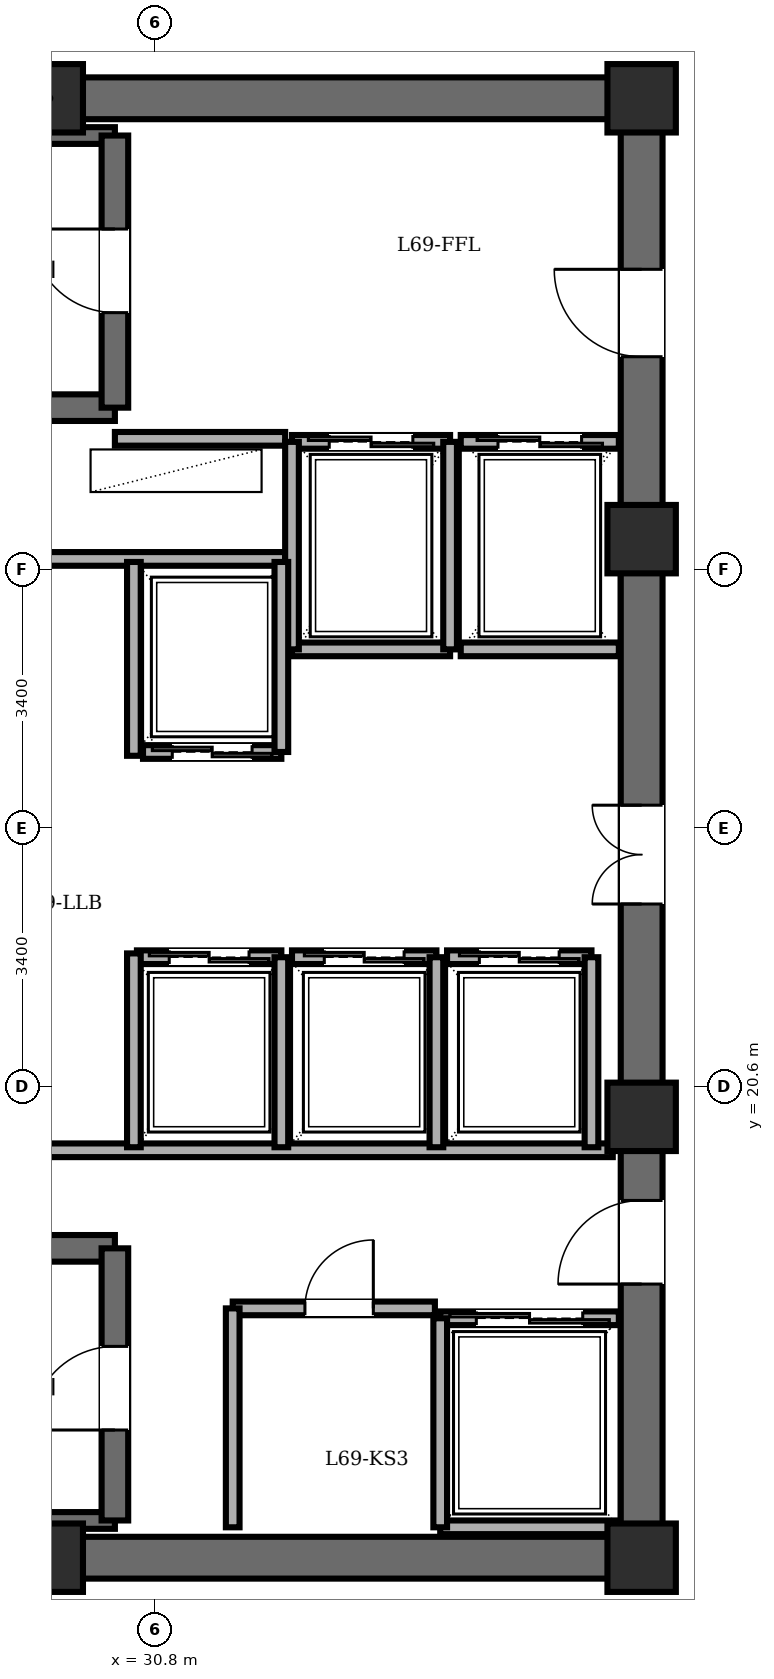
"""IFC4 building model, lengths in metres.
Left out: names, types, materials, properties, quantities, classifications, styles, units other than length and angle.
Written with IfcOpenShell. Run it as: python <this file> out.ifc"""

import sys

from ifc_helpers import new_model, si_unit, direction, frame, frame_2d, origin, origin_2d, place, context, subcontext, project, spatial, rectangle, extrude, element, fill, save


model = new_model("IFC4")
c1 = context("Model", 3, precision=1e-05, world=origin(), true_north=direction((0.0, 1.0)))
c2 = subcontext(c1, "Body", "Model", "MODEL_VIEW")
j1 = project(units=[si_unit("LENGTHUNIT", "METRE"), si_unit("PLANEANGLEUNIT", "RADIAN")], contexts=[c1])
p1 = place(None, origin())
s1 = spatial("IfcSite", under=j1, at=p1, CompositionType="ELEMENT")
p2 = place(p1, origin())
s2 = spatial("IfcBuilding", under=s1, at=p2, CompositionType="ELEMENT")
p3 = place(p2, frame((0.0, 0.0, 266.1)))
s3 = spatial("IfcBuildingStorey", under=s2, at=p3, CompositionType="ELEMENT", Elevation=266.1)
for number, where, z_axis, x_axis in (
    (1, (29.4, 14.4, 0.0), (0.0, 0.0, 1.0), (1.0, 0.0, 0.0)),
    (2, (37.2, 14.4, 0.0), (0.0, 0.0, 1.0), (1.0, 0.0, 0.0)),
    (3, (37.2, 20.2, 0.0), (0.0, 0.0, 1.0), (1.0, 0.0, 0.0)),
    (4, (37.2, 27.8, 0.0), (0.0, 0.0, 1.0), (1.0, 0.0, 0.0)),
    (5, (37.2, 33.6, 0.0), (0.0, 0.0, 1.0), (1.0, 0.0, 0.0)),
    (6, (29.4, 33.6, 0.0), (0.0, 0.0, 1.0), (1.0, 0.0, 0.0)),
):
    element("IfcColumn", number, at=place(p3, frame(where, z_axis=z_axis, x_axis=x_axis)), inside=s3, PredefinedType="COLUMN", context=c2, shape_type="SweptSolid", body=[
        extrude(rectangle(XDim=0.9, YDim=0.9, at=origin_2d()), origin(), (0.0, 0.0, 1.0), 3.65),
    ])
for number, where, z_axis, x_axis in (
    (7, (21.6, 33.6, 0.0), (0.0, 0.0, 1.0), (1.0, 0.0, 0.0)),
    (8, (37.2, 14.4, 0.0), (0.0, 0.0, 1.0), (-1.0, 0.0, 0.0)),
):
    element("IfcWall", number, at=place(p3, frame(where, z_axis=z_axis, x_axis=x_axis)), inside=s3, PredefinedType="SHEAR", context=c2, shape_type="SweptSolid", body=[
        extrude(rectangle(XDim=15.6, YDim=0.55, at=frame_2d((7.8, 0.0))), origin(), (0.0, 0.0, 1.0), 3.45),
    ])
p4 = place(p3, frame((37.2, 14.4, 0.0), z_axis=(0.0, 0.0, 1.0), x_axis=(0.0, 1.0, 0.0)))
e9 = element("IfcWall", 9, at=p4, inside=s3, PredefinedType="SHEAR", context=c2, shape_type="SweptSolid", body=[
    extrude(rectangle(XDim=19.2, YDim=0.55, at=frame_2d((9.6, 0.0))), origin(), (0.0, 0.0, 1.0), 3.45),
])
p5 = place(p4, frame((15.8, 0.0, 0.0)))
e10 = element("IfcOpeningElement", 10, at=p5, cuts=e9, PredefinedType="OPENING", context=c2, shape_type="SweptSolid", body=[
    extrude(rectangle(XDim=1.15, YDim=2.15, at=frame_2d((0.575, 1.075))), frame((0.0, 0.285, 0.0), z_axis=(0.0, -1.0, 0.0), x_axis=(1.0, 0.0, 0.0)), (0.0, 0.0, 1.0), 0.57),
])
p6 = place(p4, frame((3.6, 0.0, 0.0)))
e11 = element("IfcOpeningElement", 11, at=p6, cuts=e9, PredefinedType="OPENING", context=c2, shape_type="SweptSolid", body=[
    extrude(rectangle(XDim=1.1, YDim=2.15, at=frame_2d((0.55, 1.075))), frame((0.0, 0.285, 0.0), z_axis=(0.0, -1.0, 0.0), x_axis=(1.0, 0.0, 0.0)), (0.0, 0.0, 1.0), 0.57),
])
p7 = place(p4, frame((8.6, 0.0, 0.0)))
e12 = element("IfcOpeningElement", 12, at=p7, cuts=e9, PredefinedType="OPENING", context=c2, shape_type="SweptSolid", body=[
    extrude(rectangle(XDim=1.3, YDim=2.2, at=frame_2d((0.65, 1.1))), frame((0.0, 0.285, 0.0), z_axis=(0.0, -1.0, 0.0), x_axis=(1.0, 0.0, 0.0)), (0.0, 0.0, 1.0), 0.57),
])
p8 = place(p3, frame((22.48, 29.53, 0.0), z_axis=(0.0, 0.0, 1.0), x_axis=(1.0, 0.0, 0.0)))
e13 = element("IfcWall", 13, at=p8, inside=s3, PredefinedType="SOLIDWALL", context=c2, shape_type="SweptSolid", body=[
    extrude(rectangle(XDim=7.79, YDim=0.35, at=frame_2d((3.895, 0.0))), origin(), (0.0, 0.0, 1.0), 3.45),
])
p9 = place(p3, frame((22.48, 33.11, 0.0), z_axis=(0.0, 0.0, 1.0), x_axis=(1.0, 0.0, 0.0)))
e14 = element("IfcWall", 14, at=p9, inside=s3, PredefinedType="PARTITIONING", context=c2, shape_type="SweptSolid", body=[
    extrude(rectangle(XDim=7.79, YDim=0.22, at=frame_2d((3.895, 0.0))), origin(), (0.0, 0.0, 1.0), 3.45),
])
p10 = place(p3, frame((30.27, 29.53, 0.0), z_axis=(0.0, 0.0, 1.0), x_axis=(0.0, 1.0, 0.0)))
e15 = element("IfcWall", 15, at=p10, inside=s3, PredefinedType="SOLIDWALL", context=c2, shape_type="SweptSolid", body=[
    extrude(rectangle(XDim=3.58, YDim=0.35, at=frame_2d((1.79, 0.0))), origin(), (0.0, 0.0, 1.0), 3.45),
])
p11 = place(p10, frame((1.25, 0.0, 0.0)))
e16 = element("IfcOpeningElement", 16, at=p11, cuts=e15, PredefinedType="OPENING", context=c2, shape_type="SweptSolid", body=[
    extrude(rectangle(XDim=1.1, YDim=2.15, at=frame_2d((0.55, 1.075))), frame((0.0, 0.185, 0.0), z_axis=(0.0, -1.0, 0.0), x_axis=(1.0, 0.0, 0.0)), (0.0, 0.0, 1.0), 0.37),
])
p12 = place(p3, frame((22.48, 18.47, 0.0), z_axis=(0.0, 0.0, 1.0), x_axis=(1.0, 0.0, 0.0)))
e17 = element("IfcWall", 17, at=p12, inside=s3, PredefinedType="SOLIDWALL", context=c2, shape_type="SweptSolid", body=[
    extrude(rectangle(XDim=7.79, YDim=0.35, at=frame_2d((3.895, 0.0))), origin(), (0.0, 0.0, 1.0), 3.45),
])
p13 = place(p3, frame((22.48, 14.89, 0.0), z_axis=(0.0, 0.0, 1.0), x_axis=(1.0, 0.0, 0.0)))
e18 = element("IfcWall", 18, at=p13, inside=s3, PredefinedType="PARTITIONING", context=c2, shape_type="SweptSolid", body=[
    extrude(rectangle(XDim=7.79, YDim=0.22, at=frame_2d((3.895, 0.0))), origin(), (0.0, 0.0, 1.0), 3.45),
])
p14 = place(p3, frame((30.27, 14.89, 0.0), z_axis=(0.0, 0.0, 1.0), x_axis=(0.0, 1.0, 0.0)))
e19 = element("IfcWall", 19, at=p14, inside=s3, PredefinedType="SOLIDWALL", context=c2, shape_type="SweptSolid", body=[
    extrude(rectangle(XDim=3.58, YDim=0.35, at=frame_2d((1.79, 0.0))), origin(), (0.0, 0.0, 1.0), 3.45),
])
p15 = place(p14, frame((1.19, 0.0, 0.0)))
e20 = element("IfcOpeningElement", 20, at=p15, cuts=e19, PredefinedType="OPENING", context=c2, shape_type="SweptSolid", body=[
    extrude(rectangle(XDim=1.1, YDim=2.15, at=frame_2d((0.55, 1.075))), frame((0.0, 0.185, 0.0), z_axis=(0.0, -1.0, 0.0), x_axis=(1.0, 0.0, 0.0)), (0.0, 0.0, 1.0), 0.37),
])
p16 = place(p3, frame((30.27, 29.12, 0.0), z_axis=(0.0, 0.0, 1.0), x_axis=(1.0, 0.0, 0.0)))
e21 = element("IfcWall", 21, at=p16, inside=s3, PredefinedType="PARTITIONING", context=c2, shape_type="SweptSolid", body=[
    extrude(rectangle(XDim=2.24, YDim=0.18, at=frame_2d((1.12, 0.0))), origin(), (0.0, 0.0, 1.0), 3.45),
])
p17 = place(p3, frame((21.95, 27.54, 0.0), z_axis=(0.0, 0.0, 1.0), x_axis=(1.0, 0.0, 0.0)))
e22 = element("IfcWall", 22, at=p17, inside=s3, PredefinedType="PARTITIONING", context=c2, shape_type="SweptSolid", body=[
    extrude(rectangle(XDim=10.56, YDim=0.18, at=frame_2d((5.28, 0.0))), origin(), (0.0, 0.0, 1.0), 3.45),
])
p18 = place(p3, frame((21.95, 19.76, 0.0), z_axis=(0.0, 0.0, 1.0), x_axis=(1.0, 0.0, 0.0)))
e23 = element("IfcWall", 23, at=p18, inside=s3, PredefinedType="PARTITIONING", context=c2, shape_type="SweptSolid", body=[
    extrude(rectangle(XDim=14.87, YDim=0.18, at=frame_2d((7.435, 0.0))), origin(), (0.0, 0.0, 1.0), 3.45),
])
p19 = place(p3, frame((31.82, 17.68, 0.0), z_axis=(0.0, 0.0, 1.0), x_axis=(1.0, 0.0, 0.0)))
e24 = element("IfcWall", 24, at=p19, inside=s3, PredefinedType="PARTITIONING", context=c2, shape_type="SweptSolid", body=[
    extrude(rectangle(XDim=2.66, YDim=0.18, at=frame_2d((1.33, 0.0))), origin(), (0.0, 0.0, 1.0), 3.45),
])
p20 = place(p19, frame((0.95, 0.0, 0.0)))
e25 = element("IfcOpeningElement", 25, at=p20, cuts=e24, PredefinedType="OPENING", context=c2, shape_type="SweptSolid", body=[
    extrude(rectangle(XDim=0.9, YDim=2.05, at=frame_2d((0.45, 1.025))), frame((0.0, 0.1, 0.0), z_axis=(0.0, -1.0, 0.0), x_axis=(1.0, 0.0, 0.0)), (0.0, 0.0, 1.0), 0.2),
])
p21 = place(p3, frame((31.82, 14.8, 0.0), z_axis=(0.0, 0.0, 1.0), x_axis=(0.0, 1.0, 0.0)))
e26 = element("IfcWall", 26, at=p21, inside=s3, PredefinedType="PARTITIONING", context=c2, shape_type="SweptSolid", body=[
    extrude(rectangle(XDim=2.88, YDim=0.18, at=frame_2d((1.44, 0.0))), origin(), (0.0, 0.0, 1.0), 3.45),
])
p22 = place(p3, frame((32.6, 29.08, 0.0), z_axis=(0.0, 0.0, 1.0), x_axis=(1.0, 0.0, 0.0)))
e27 = element("IfcWall", 27, at=p22, inside=s3, PredefinedType="PARTITIONING", context=c2, shape_type="SweptSolid", body=[
    extrude(rectangle(XDim=2.08, YDim=0.18, at=frame_2d((1.04, 0.0))), origin(), (0.0, 0.0, 1.0), 3.45),
])
p23 = place(p22, frame((0.49, 0.0, 0.0)))
e28 = element("IfcOpeningElement", 28, at=p23, cuts=e27, PredefinedType="OPENING", context=c2, shape_type="SweptSolid", body=[
    extrude(rectangle(XDim=1.1, YDim=2.2, at=frame_2d((0.55, 1.1))), frame((0.0, 0.1, 0.0), z_axis=(0.0, -1.0, 0.0), x_axis=(1.0, 0.0, 0.0)), (0.0, 0.0, 1.0), 0.2),
])
p24 = place(p3, frame((34.68, 26.35, 0.0), z_axis=(0.0, 0.0, 1.0), x_axis=(-1.0, 0.0, 0.0)))
e29 = element("IfcWall", 29, at=p24, inside=s3, PredefinedType="PARTITIONING", context=c2, shape_type="SweptSolid", body=[
    extrude(rectangle(XDim=2.08, YDim=0.18, at=frame_2d((1.04, 0.0))), origin(), (0.0, 0.0, 1.0), 3.45),
])
for number, where, z_axis, x_axis in (
    (30, (34.68, 26.35, 0.0), (0.0, 0.0, 1.0), (0.0, 1.0, 0.0)),
    (31, (32.6, 29.08, 0.0), (0.0, 0.0, 1.0), (0.0, -1.0, 0.0)),
):
    element("IfcWall", number, at=place(p3, frame(where, z_axis=z_axis, x_axis=x_axis)), inside=s3, PredefinedType="PARTITIONING", context=c2, shape_type="SweptSolid", body=[
        extrude(rectangle(XDim=2.73, YDim=0.18, at=frame_2d((1.365, 0.0))), origin(), (0.0, 0.0, 1.0), 3.45),
    ])
p25 = place(p3, frame((34.82, 29.08, 0.0), z_axis=(0.0, 0.0, 1.0), x_axis=(1.0, 0.0, 0.0)))
e32 = element("IfcWall", 32, at=p25, inside=s3, PredefinedType="PARTITIONING", context=c2, shape_type="SweptSolid", body=[
    extrude(rectangle(XDim=2.08, YDim=0.18, at=frame_2d((1.04, 0.0))), origin(), (0.0, 0.0, 1.0), 3.45),
])
p26 = place(p25, frame((0.49, 0.0, 0.0)))
e33 = element("IfcOpeningElement", 33, at=p26, cuts=e32, PredefinedType="OPENING", context=c2, shape_type="SweptSolid", body=[
    extrude(rectangle(XDim=1.1, YDim=2.2, at=frame_2d((0.55, 1.1))), frame((0.0, 0.1, 0.0), z_axis=(0.0, -1.0, 0.0), x_axis=(1.0, 0.0, 0.0)), (0.0, 0.0, 1.0), 0.2),
])
p27 = place(p3, frame((36.9, 26.35, 0.0), z_axis=(0.0, 0.0, 1.0), x_axis=(-1.0, 0.0, 0.0)))
e34 = element("IfcWall", 34, at=p27, inside=s3, PredefinedType="PARTITIONING", context=c2, shape_type="SweptSolid", body=[
    extrude(rectangle(XDim=2.08, YDim=0.18, at=frame_2d((1.04, 0.0))), origin(), (0.0, 0.0, 1.0), 3.45),
])
p28 = place(p3, frame((34.55, 17.55, 0.0), z_axis=(0.0, 0.0, 1.0), x_axis=(1.0, 0.0, 0.0)))
e35 = element("IfcWall", 35, at=p28, inside=s3, PredefinedType="PARTITIONING", context=c2, shape_type="SweptSolid", body=[
    extrude(rectangle(XDim=2.35, YDim=0.18, at=frame_2d((1.175, 0.0))), origin(), (0.0, 0.0, 1.0), 3.45),
])
p29 = place(p28, frame((0.475, 0.0, 0.0)))
e36 = element("IfcOpeningElement", 36, at=p29, cuts=e35, PredefinedType="OPENING", context=c2, shape_type="SweptSolid", body=[
    extrude(rectangle(XDim=1.4, YDim=2.3, at=frame_2d((0.7, 1.15))), frame((0.0, 0.1, 0.0), z_axis=(0.0, -1.0, 0.0), x_axis=(1.0, 0.0, 0.0)), (0.0, 0.0, 1.0), 0.2),
])
p30 = place(p3, frame((36.9, 14.8, 0.0), z_axis=(0.0, 0.0, 1.0), x_axis=(-1.0, 0.0, 0.0)))
e37 = element("IfcWall", 37, at=p30, inside=s3, PredefinedType="PARTITIONING", context=c2, shape_type="SweptSolid", body=[
    extrude(rectangle(XDim=2.35, YDim=0.18, at=frame_2d((1.175, 0.0))), origin(), (0.0, 0.0, 1.0), 3.45),
])
p31 = place(p3, frame((34.55, 17.55, 0.0), z_axis=(0.0, 0.0, 1.0), x_axis=(0.0, -1.0, 0.0)))
e38 = element("IfcWall", 38, at=p31, inside=s3, PredefinedType="PARTITIONING", context=c2, shape_type="SweptSolid", body=[
    extrude(rectangle(XDim=2.75, YDim=0.18, at=frame_2d((1.375, 0.0))), origin(), (0.0, 0.0, 1.0), 3.45),
])
p32 = place(p3, frame((32.46, 25.0, 0.0), z_axis=(0.0, 0.0, 1.0), x_axis=(-1.0, 0.0, 0.0)))
e39 = element("IfcWall", 39, at=p32, inside=s3, PredefinedType="PARTITIONING", context=c2, shape_type="SweptSolid", body=[
    extrude(rectangle(XDim=1.82, YDim=0.18, at=frame_2d((0.91, 0.0))), origin(), (0.0, 0.0, 1.0), 3.45),
])
p33 = place(p32, frame((0.385, 0.0, 0.0)))
e40 = element("IfcOpeningElement", 40, at=p33, cuts=e39, PredefinedType="OPENING", context=c2, shape_type="SweptSolid", body=[
    extrude(rectangle(XDim=1.05, YDim=2.2, at=frame_2d((0.525, 1.1))), frame((0.0, 0.1, 0.0), z_axis=(0.0, -1.0, 0.0), x_axis=(1.0, 0.0, 0.0)), (0.0, 0.0, 1.0), 0.2),
])
p34 = place(p3, frame((32.46, 25.0, 0.0), z_axis=(0.0, 0.0, 1.0), x_axis=(0.0, 1.0, 0.0)))
e41 = element("IfcWall", 41, at=p34, inside=s3, PredefinedType="PARTITIONING", context=c2, shape_type="SweptSolid", body=[
    extrude(rectangle(XDim=2.5, YDim=0.18, at=frame_2d((1.25, 0.0))), origin(), (0.0, 0.0, 1.0), 3.45),
])
p35 = place(p3, frame((30.56, 22.3, 0.0), z_axis=(0.0, 0.0, 1.0), x_axis=(1.0, 0.0, 0.0)))
e42 = element("IfcWall", 42, at=p35, inside=s3, PredefinedType="PARTITIONING", context=c2, shape_type="SweptSolid", body=[
    extrude(rectangle(XDim=1.9, YDim=0.18, at=frame_2d((0.95, 0.0))), origin(), (0.0, 0.0, 1.0), 3.45),
])
p36 = place(p35, frame((0.425, 0.0, 0.0)))
e43 = element("IfcOpeningElement", 43, at=p36, cuts=e42, PredefinedType="OPENING", context=c2, shape_type="SweptSolid", body=[
    extrude(rectangle(XDim=1.05, YDim=2.2, at=frame_2d((0.525, 1.1))), frame((0.0, 0.1, 0.0), z_axis=(0.0, -1.0, 0.0), x_axis=(1.0, 0.0, 0.0)), (0.0, 0.0, 1.0), 0.2),
])
p37 = place(p3, frame((32.46, 19.8, 0.0), z_axis=(0.0, 0.0, 1.0), x_axis=(0.0, 1.0, 0.0)))
e44 = element("IfcWall", 44, at=p37, inside=s3, PredefinedType="PARTITIONING", context=c2, shape_type="SweptSolid", body=[
    extrude(rectangle(XDim=2.5, YDim=0.18, at=frame_2d((1.25, 0.0))), origin(), (0.0, 0.0, 1.0), 3.45),
])
p38 = place(p3, frame((32.6, 22.3, 0.0), z_axis=(0.0, 0.0, 1.0), x_axis=(1.0, 0.0, 0.0)))
e45 = element("IfcWall", 45, at=p38, inside=s3, PredefinedType="PARTITIONING", context=c2, shape_type="SweptSolid", body=[
    extrude(rectangle(XDim=1.9, YDim=0.18, at=frame_2d((0.95, 0.0))), origin(), (0.0, 0.0, 1.0), 3.45),
])
p39 = place(p38, frame((0.425, 0.0, 0.0)))
e46 = element("IfcOpeningElement", 46, at=p39, cuts=e45, PredefinedType="OPENING", context=c2, shape_type="SweptSolid", body=[
    extrude(rectangle(XDim=1.05, YDim=2.2, at=frame_2d((0.525, 1.1))), frame((0.0, 0.1, 0.0), z_axis=(0.0, -1.0, 0.0), x_axis=(1.0, 0.0, 0.0)), (0.0, 0.0, 1.0), 0.2),
])
p40 = place(p3, frame((34.5, 19.8, 0.0), z_axis=(0.0, 0.0, 1.0), x_axis=(0.0, 1.0, 0.0)))
e47 = element("IfcWall", 47, at=p40, inside=s3, PredefinedType="PARTITIONING", context=c2, shape_type="SweptSolid", body=[
    extrude(rectangle(XDim=2.5, YDim=0.18, at=frame_2d((1.25, 0.0))), origin(), (0.0, 0.0, 1.0), 3.45),
])
p41 = place(p3, frame((34.64, 22.3, 0.0), z_axis=(0.0, 0.0, 1.0), x_axis=(1.0, 0.0, 0.0)))
e48 = element("IfcWall", 48, at=p41, inside=s3, PredefinedType="PARTITIONING", context=c2, shape_type="SweptSolid", body=[
    extrude(rectangle(XDim=1.9, YDim=0.18, at=frame_2d((0.95, 0.0))), origin(), (0.0, 0.0, 1.0), 3.45),
])
p42 = place(p41, frame((0.425, 0.0, 0.0)))
e49 = element("IfcOpeningElement", 49, at=p42, cuts=e48, PredefinedType="OPENING", context=c2, shape_type="SweptSolid", body=[
    extrude(rectangle(XDim=1.05, YDim=2.2, at=frame_2d((0.525, 1.1))), frame((0.0, 0.1, 0.0), z_axis=(0.0, -1.0, 0.0), x_axis=(1.0, 0.0, 0.0)), (0.0, 0.0, 1.0), 0.2),
])
p43 = place(p3, frame((36.54, 19.8, 0.0), z_axis=(0.0, 0.0, 1.0), x_axis=(0.0, 1.0, 0.0)))
e50 = element("IfcWall", 50, at=p43, inside=s3, PredefinedType="PARTITIONING", context=c2, shape_type="SweptSolid", body=[
    extrude(rectangle(XDim=2.5, YDim=0.18, at=frame_2d((1.25, 0.0))), origin(), (0.0, 0.0, 1.0), 3.45),
])
for number, where, z_axis, x_axis in (
    (51, (30.52, 24.95, 0.0), (0.0, 0.0, 1.0), (0.0, 1.0, 0.0)),
    (52, (30.52, 19.8, 0.0), (0.0, 0.0, 1.0), (0.0, 1.0, 0.0)),
):
    element("IfcWall", number, at=place(p3, frame(where, z_axis=z_axis, x_axis=x_axis)), inside=s3, PredefinedType="PARTITIONING", context=c2, shape_type="SweptSolid", body=[
        extrude(rectangle(XDim=2.55, YDim=0.18, at=frame_2d((1.275, 0.0))), origin(), (0.0, 0.0, 1.0), 3.45),
    ])
p44 = place(p11, origin())
e53 = element("IfcDoor", 53, at=p44, inside=s3, OperationType="SINGLE_SWING_RIGHT", PredefinedType="DOOR", context=c2, shape_type="SweptSolid", body=[
    extrude(rectangle(XDim=1.1, YDim=2.15, at=frame_2d((0.55, 1.075))), frame((0.0, 0.025, 0.0), z_axis=(0.0, -1.0, 0.0), x_axis=(1.0, 0.0, 0.0)), (0.0, 0.0, 1.0), 0.05),
])
fill(e16, e53)
p45 = place(p15, origin())
e54 = element("IfcDoor", 54, at=p45, inside=s3, OperationType="SINGLE_SWING_LEFT", PredefinedType="DOOR", context=c2, shape_type="SweptSolid", body=[
    extrude(rectangle(XDim=1.1, YDim=2.15, at=frame_2d((0.55, 1.075))), frame((0.0, 0.025, 0.0), z_axis=(0.0, -1.0, 0.0), x_axis=(1.0, 0.0, 0.0)), (0.0, 0.0, 1.0), 0.05),
])
fill(e20, e54)
p46 = place(p5, origin())
e55 = element("IfcDoor", 55, at=p46, inside=s3, OperationType="SINGLE_SWING_RIGHT", PredefinedType="DOOR", context=c2, shape_type="SweptSolid", body=[
    extrude(rectangle(XDim=1.15, YDim=2.15, at=frame_2d((0.575, 1.075))), frame((0.0, 0.025, 0.0), z_axis=(0.0, -1.0, 0.0), x_axis=(1.0, 0.0, 0.0)), (0.0, 0.0, 1.0), 0.05),
])
fill(e10, e55)
p47 = place(p6, origin())
e56 = element("IfcDoor", 56, at=p47, inside=s3, OperationType="SINGLE_SWING_LEFT", PredefinedType="DOOR", context=c2, shape_type="SweptSolid", body=[
    extrude(rectangle(XDim=1.1, YDim=2.15, at=frame_2d((0.55, 1.075))), frame((0.0, 0.025, 0.0), z_axis=(0.0, -1.0, 0.0), x_axis=(1.0, 0.0, 0.0)), (0.0, 0.0, 1.0), 0.05),
])
fill(e11, e56)
p48 = place(p20, origin())
e57 = element("IfcDoor", 57, at=p48, inside=s3, OperationType="SINGLE_SWING_RIGHT", PredefinedType="DOOR", context=c2, shape_type="SweptSolid", body=[
    extrude(rectangle(XDim=0.9, YDim=2.05, at=frame_2d((0.45, 1.025))), frame((0.0, 0.025, 0.0), z_axis=(0.0, -1.0, 0.0), x_axis=(1.0, 0.0, 0.0)), (0.0, 0.0, 1.0), 0.05),
])
fill(e25, e57)
p49 = place(p23, origin())
e58 = element("IfcDoor", 58, at=p49, inside=s3, OperationType="DOUBLE_DOOR_SLIDING", PredefinedType="DOOR", context=c2, shape_type="SweptSolid", body=[
    extrude(rectangle(XDim=1.1, YDim=2.2, at=frame_2d((0.55, 1.1))), frame((0.0, 0.025, 0.0), z_axis=(0.0, -1.0, 0.0), x_axis=(1.0, 0.0, 0.0)), (0.0, 0.0, 1.0), 0.05),
])
fill(e28, e58)
p50 = place(p26, origin())
e59 = element("IfcDoor", 59, at=p50, inside=s3, OperationType="DOUBLE_DOOR_SLIDING", PredefinedType="DOOR", context=c2, shape_type="SweptSolid", body=[
    extrude(rectangle(XDim=1.1, YDim=2.2, at=frame_2d((0.55, 1.1))), frame((0.0, 0.025, 0.0), z_axis=(0.0, -1.0, 0.0), x_axis=(1.0, 0.0, 0.0)), (0.0, 0.0, 1.0), 0.05),
])
fill(e33, e59)
p51 = place(p29, origin())
e60 = element("IfcDoor", 60, at=p51, inside=s3, OperationType="DOUBLE_DOOR_SLIDING", PredefinedType="DOOR", context=c2, shape_type="SweptSolid", body=[
    extrude(rectangle(XDim=1.4, YDim=2.3, at=frame_2d((0.7, 1.15))), frame((0.0, 0.025, 0.0), z_axis=(0.0, -1.0, 0.0), x_axis=(1.0, 0.0, 0.0)), (0.0, 0.0, 1.0), 0.05),
])
fill(e36, e60)
p52 = place(p33, origin())
e61 = element("IfcDoor", 61, at=p52, inside=s3, OperationType="DOUBLE_DOOR_SLIDING", PredefinedType="DOOR", context=c2, shape_type="SweptSolid", body=[
    extrude(rectangle(XDim=1.05, YDim=2.2, at=frame_2d((0.525, 1.1))), frame((0.0, 0.025, 0.0), z_axis=(0.0, -1.0, 0.0), x_axis=(1.0, 0.0, 0.0)), (0.0, 0.0, 1.0), 0.05),
])
fill(e40, e61)
p53 = place(p36, origin())
e62 = element("IfcDoor", 62, at=p53, inside=s3, OperationType="DOUBLE_DOOR_SLIDING", PredefinedType="DOOR", context=c2, shape_type="SweptSolid", body=[
    extrude(rectangle(XDim=1.05, YDim=2.2, at=frame_2d((0.525, 1.1))), frame((0.0, 0.025, 0.0), z_axis=(0.0, -1.0, 0.0), x_axis=(1.0, 0.0, 0.0)), (0.0, 0.0, 1.0), 0.05),
])
fill(e43, e62)
p54 = place(p39, origin())
e63 = element("IfcDoor", 63, at=p54, inside=s3, OperationType="DOUBLE_DOOR_SLIDING", PredefinedType="DOOR", context=c2, shape_type="SweptSolid", body=[
    extrude(rectangle(XDim=1.05, YDim=2.2, at=frame_2d((0.525, 1.1))), frame((0.0, 0.025, 0.0), z_axis=(0.0, -1.0, 0.0), x_axis=(1.0, 0.0, 0.0)), (0.0, 0.0, 1.0), 0.05),
])
fill(e46, e63)
p55 = place(p42, origin())
e64 = element("IfcDoor", 64, at=p55, inside=s3, OperationType="DOUBLE_DOOR_SLIDING", PredefinedType="DOOR", context=c2, shape_type="SweptSolid", body=[
    extrude(rectangle(XDim=1.05, YDim=2.2, at=frame_2d((0.525, 1.1))), frame((0.0, 0.025, 0.0), z_axis=(0.0, -1.0, 0.0), x_axis=(1.0, 0.0, 0.0)), (0.0, 0.0, 1.0), 0.05),
])
fill(e49, e64)
p56 = place(p7, origin())
e65 = element("IfcDoor", 65, at=p56, inside=s3, OperationType="DOUBLE_DOOR_SINGLE_SWING", PredefinedType="DOOR", context=c2, shape_type="SweptSolid", body=[
    extrude(rectangle(XDim=1.3, YDim=2.2, at=frame_2d((0.65, 1.1))), frame((0.0, 0.025, 0.0), z_axis=(0.0, -1.0, 0.0), x_axis=(1.0, 0.0, 0.0)), (0.0, 0.0, 1.0), 0.05),
])
fill(e12, e65)
save(model, sys.argv[1])
